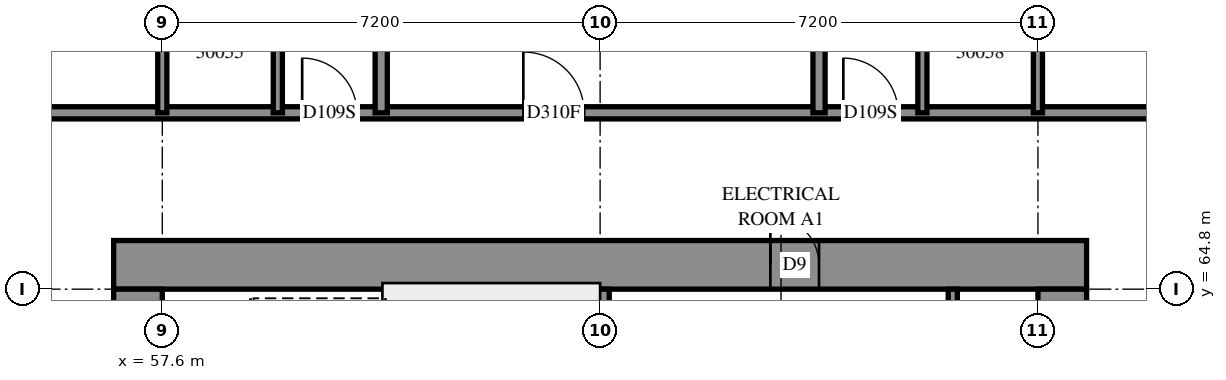
"""IFC4 building model, lengths in metres.
Left out: names, types, materials, properties, quantities, classifications, styles, units other than length and angle.
Written with IfcOpenShell. Run it as: python <this file> out.ifc"""

import sys

from ifc_helpers import new_model, si_unit, direction, frame, frame_2d, origin, place, context, subcontext, project, spatial, rectangle, extrude, element, fill, save


model = new_model("IFC4")
c1 = context("Model", 3, precision=1e-05, world=origin(), true_north=direction((0.0, 1.0)))
c2 = subcontext(c1, "Body", "Model", "MODEL_VIEW")
j1 = project(units=[si_unit("LENGTHUNIT", "METRE"), si_unit("PLANEANGLEUNIT", "RADIAN")], contexts=[c1])
p1 = place(None, origin())
s1 = spatial("IfcSite", under=j1, at=p1, CompositionType="ELEMENT")
p2 = place(p1, origin())
s2 = spatial("IfcBuilding", under=s1, at=p2, CompositionType="ELEMENT")
p3 = place(p2, frame((0.0, 0.0, 111.8)))
s3 = spatial("IfcBuildingStorey", under=s2, at=p3, CompositionType="ELEMENT", Elevation=111.8)
p4 = place(p3, frame((56.8, 65.2, -0.3), z_axis=(0.0, 0.0, 1.0), x_axis=(1.0, 0.0, 0.0)))
e1 = element("IfcWall", 1, at=p4, inside=s3, PredefinedType="SHEAR", context=c2, shape_type="SweptSolid", body=[
    extrude(rectangle(XDim=16.0, YDim=0.8, at=frame_2d((8.0, 0.0))), origin(), (0.0, 0.0, 1.0), 2.7),
])
p5 = place(p4, frame((10.8, 0.0, 0.3)))
e2 = element("IfcOpeningElement", 2, at=p5, cuts=e1, PredefinedType="OPENING", context=c2, shape_type="SweptSolid", body=[
    extrude(rectangle(XDim=0.8, YDim=2.1, at=frame_2d((0.4, 1.05))), frame((0.0, 0.41, 0.0), z_axis=(0.0, -1.0, 0.0), x_axis=(1.0, 0.0, 0.0)), (0.0, 0.0, 1.0), 0.82),
])
p6 = place(p3, frame((57.2, 50.4, -0.3), z_axis=(0.0, 0.0, 1.0), x_axis=(0.0, 1.0, 0.0)))
e3 = element("IfcWall", 3, at=p6, inside=s3, PredefinedType="SHEAR", context=c2, shape_type="SweptSolid", body=[
    extrude(rectangle(XDim=14.4, YDim=0.8, at=frame_2d((7.2, 0.0))), origin(), (0.0, 0.0, 1.0), 2.7),
])
p7 = place(p6, frame((4.55, 0.0, 0.3)))
e4 = element("IfcOpeningElement", 4, at=p7, cuts=e3, PredefinedType="OPENING", context=c2, shape_type="SweptSolid", body=[
    extrude(rectangle(XDim=1.1, YDim=2.1, at=frame_2d((0.55, 1.05))), frame((0.0, 0.41, 0.0), z_axis=(0.0, -1.0, 0.0), x_axis=(1.0, 0.0, 0.0)), (0.0, 0.0, 1.0), 0.82),
])
p8 = place(p6, frame((11.35, 0.0, 0.3)))
e5 = element("IfcOpeningElement", 5, at=p8, cuts=e3, PredefinedType="OPENING", context=c2, shape_type="SweptSolid", body=[
    extrude(rectangle(XDim=1.1, YDim=2.1, at=frame_2d((0.55, 1.05))), frame((0.0, 0.41, 0.0), z_axis=(0.0, -1.0, 0.0), x_axis=(1.0, 0.0, 0.0)), (0.0, 0.0, 1.0), 0.82),
])
p9 = place(p3, frame((72.4, 50.4, -0.3), z_axis=(0.0, 0.0, 1.0), x_axis=(0.0, 1.0, 0.0)))
e6 = element("IfcWall", 6, at=p9, inside=s3, PredefinedType="SHEAR", context=c2, shape_type="SweptSolid", body=[
    extrude(rectangle(XDim=14.4, YDim=0.8, at=frame_2d((7.2, 0.0))), origin(), (0.0, 0.0, 1.0), 2.7),
])
p10 = place(p9, frame((4.55, 0.0, 0.3)))
e7 = element("IfcOpeningElement", 7, at=p10, cuts=e6, PredefinedType="OPENING", context=c2, shape_type="SweptSolid", body=[
    extrude(rectangle(XDim=1.1, YDim=2.1, at=frame_2d((0.55, 1.05))), frame((0.0, 0.41, 0.0), z_axis=(0.0, -1.0, 0.0), x_axis=(1.0, 0.0, 0.0)), (0.0, 0.0, 1.0), 0.82),
])
p11 = place(p9, frame((11.35, 0.0, 0.3)))
e8 = element("IfcOpeningElement", 8, at=p11, cuts=e6, PredefinedType="OPENING", context=c2, shape_type="SweptSolid", body=[
    extrude(rectangle(XDim=1.1, YDim=2.1, at=frame_2d((0.55, 1.05))), frame((0.0, 0.41, 0.0), z_axis=(0.0, -1.0, 0.0), x_axis=(1.0, 0.0, 0.0)), (0.0, 0.0, 1.0), 0.82),
])
p12 = place(p3, frame((64.8, 60.6, 0.0), z_axis=(0.0, 0.0, 1.0), x_axis=(0.0, 1.0, 0.0)))
e9 = element("IfcWall", 9, at=p12, inside=s3, PredefinedType="SOLIDWALL", context=c2, shape_type="SweptSolid", body=[
    extrude(rectangle(XDim=4.2, YDim=0.3, at=frame_2d((2.1, 0.0))), origin(), (0.0, 0.0, 1.0), 3.1),
])
p13 = place(p3, frame((70.6, 63.78, 0.0), z_axis=(0.0, 0.0, 1.0), x_axis=(0.0, 1.0, 0.0)))
e10 = element("IfcWall", 10, at=p13, inside=s3, PredefinedType="PARTITIONING", context=c2, shape_type="SweptSolid", body=[
    extrude(rectangle(XDim=1.02, YDim=0.15, at=frame_2d((0.51, 0.0))), origin(), (0.0, 0.0, 1.0), 3.1),
])
p14 = place(p3, frame((54.7, 67.7, 0.0), z_axis=(0.0, 0.0, 1.0), x_axis=(1.0, 0.0, 0.0)))
e11 = element("IfcWall", 11, at=p14, inside=s3, PredefinedType="PARTITIONING", context=c2, shape_type="SweptSolid", body=[
    extrude(rectangle(XDim=20.2, YDim=0.2, at=frame_2d((10.1, 0.0))), origin(), (0.0, 0.0, 1.0), 3.1),
])
p15 = place(p14, frame((5.2, 0.0, 0.0)))
e12 = element("IfcOpeningElement", 12, at=p15, cuts=e11, PredefinedType="OPENING", context=c2, shape_type="SweptSolid", body=[
    extrude(rectangle(XDim=0.9, YDim=2.1, at=frame_2d((0.45, 1.05))), frame((0.0, 0.11, 0.0), z_axis=(0.0, -1.0, 0.0), x_axis=(1.0, 0.0, 0.0)), (0.0, 0.0, 1.0), 0.22),
])
p16 = place(p14, frame((8.838, 0.0, 0.0)))
e13 = element("IfcOpeningElement", 13, at=p16, cuts=e11, PredefinedType="OPENING", context=c2, shape_type="SweptSolid", body=[
    extrude(rectangle(XDim=1.0, YDim=2.1, at=frame_2d((0.5, 1.05))), frame((0.0, 0.11, 0.0), z_axis=(0.0, -1.0, 0.0), x_axis=(1.0, 0.0, 0.0)), (0.0, 0.0, 1.0), 0.22),
])
p17 = place(p14, frame((14.1, 0.0, 0.0)))
e14 = element("IfcOpeningElement", 14, at=p17, cuts=e11, PredefinedType="OPENING", context=c2, shape_type="SweptSolid", body=[
    extrude(rectangle(XDim=0.9, YDim=2.1, at=frame_2d((0.45, 1.05))), frame((0.0, 0.11, 0.0), z_axis=(0.0, -1.0, 0.0), x_axis=(1.0, 0.0, 0.0)), (0.0, 0.0, 1.0), 0.22),
])
p18 = place(p3, frame((68.4, 67.7, 0.0), z_axis=(0.0, 0.0, 1.0), x_axis=(0.0, 1.0, 0.0)))
e15 = element("IfcWall", 15, at=p18, inside=s3, PredefinedType="PARTITIONING", context=c2, shape_type="SweptSolid", body=[
    extrude(rectangle(XDim=4.997, YDim=0.2, at=frame_2d((2.498, 0.0))), origin(), (0.0, 0.0, 1.0), 3.1),
])
p19 = place(p3, frame((61.2, 67.7, 0.0), z_axis=(0.0, 0.0, 1.0), x_axis=(0.0, 1.0, 0.0)))
e16 = element("IfcWall", 16, at=p19, inside=s3, PredefinedType="PARTITIONING", context=c2, shape_type="SweptSolid", body=[
    extrude(rectangle(XDim=4.954, YDim=0.2, at=frame_2d((2.477, 0.0))), origin(), (0.0, 0.0, 1.0), 3.1),
])
for number, where, z_axis, x_axis in (
    (17, (59.5, 67.7, 0.0), (0.0, 0.0, 1.0), (0.0, 1.0, 0.0)),
    (18, (57.6, 67.7, 0.0), (0.0, 0.0, 1.0), (0.0, 1.0, 0.0)),
    (19, (70.1, 67.7, 0.0), (0.0, 0.0, 1.0), (0.0, 1.0, 0.0)),
    (20, (72.0, 67.7, 0.0), (0.0, 0.0, 1.0), (0.0, 1.0, 0.0)),
):
    element("IfcWall", number, at=place(p3, frame(where, z_axis=z_axis, x_axis=x_axis)), inside=s3, PredefinedType="PARTITIONING", context=c2, shape_type="SweptSolid", body=[
        extrude(rectangle(XDim=2.4, YDim=0.15, at=frame_2d((1.2, 0.0))), origin(), (0.0, 0.0, 1.0), 3.1),
    ])
p20 = place(p5, origin())
e21 = element("IfcDoor", 21, at=p20, inside=s3, OperationType="SINGLE_SWING_RIGHT", PredefinedType="DOOR", context=c2, shape_type="SweptSolid", body=[
    extrude(rectangle(XDim=0.8, YDim=2.1, at=frame_2d((0.4, 1.05))), frame((0.0, -0.34, 0.0), z_axis=(0.0, -1.0, 0.0), x_axis=(1.0, 0.0, 0.0)), (0.0, 0.0, 1.0), 0.05),
])
fill(e2, e21)
p21 = place(p15, origin())
e22 = element("IfcDoor", 22, at=p21, inside=s3, OperationType="SINGLE_SWING_RIGHT", PredefinedType="DOOR", context=c2, shape_type="SweptSolid", body=[
    extrude(rectangle(XDim=0.9, YDim=2.1, at=frame_2d((0.45, 1.05))), frame((0.0, 0.025, 0.0), z_axis=(0.0, -1.0, 0.0), x_axis=(1.0, 0.0, 0.0)), (0.0, 0.0, 1.0), 0.05),
])
fill(e12, e22)
p22 = place(p16, origin())
e23 = element("IfcDoor", 23, at=p22, inside=s3, OperationType="SINGLE_SWING_LEFT", PredefinedType="DOOR", context=c2, shape_type="SweptSolid", body=[
    extrude(rectangle(XDim=1.0, YDim=2.1, at=frame_2d((0.5, 1.05))), frame((0.0, 0.025, 0.0), z_axis=(0.0, -1.0, 0.0), x_axis=(1.0, 0.0, 0.0)), (0.0, 0.0, 1.0), 0.05),
])
fill(e13, e23)
p23 = place(p17, origin())
e24 = element("IfcDoor", 24, at=p23, inside=s3, OperationType="SINGLE_SWING_LEFT", PredefinedType="DOOR", context=c2, shape_type="SweptSolid", body=[
    extrude(rectangle(XDim=0.9, YDim=2.1, at=frame_2d((0.45, 1.05))), frame((0.0, 0.025, 0.0), z_axis=(0.0, -1.0, 0.0), x_axis=(1.0, 0.0, 0.0)), (0.0, 0.0, 1.0), 0.05),
])
fill(e14, e24)
save(model, sys.argv[1])
